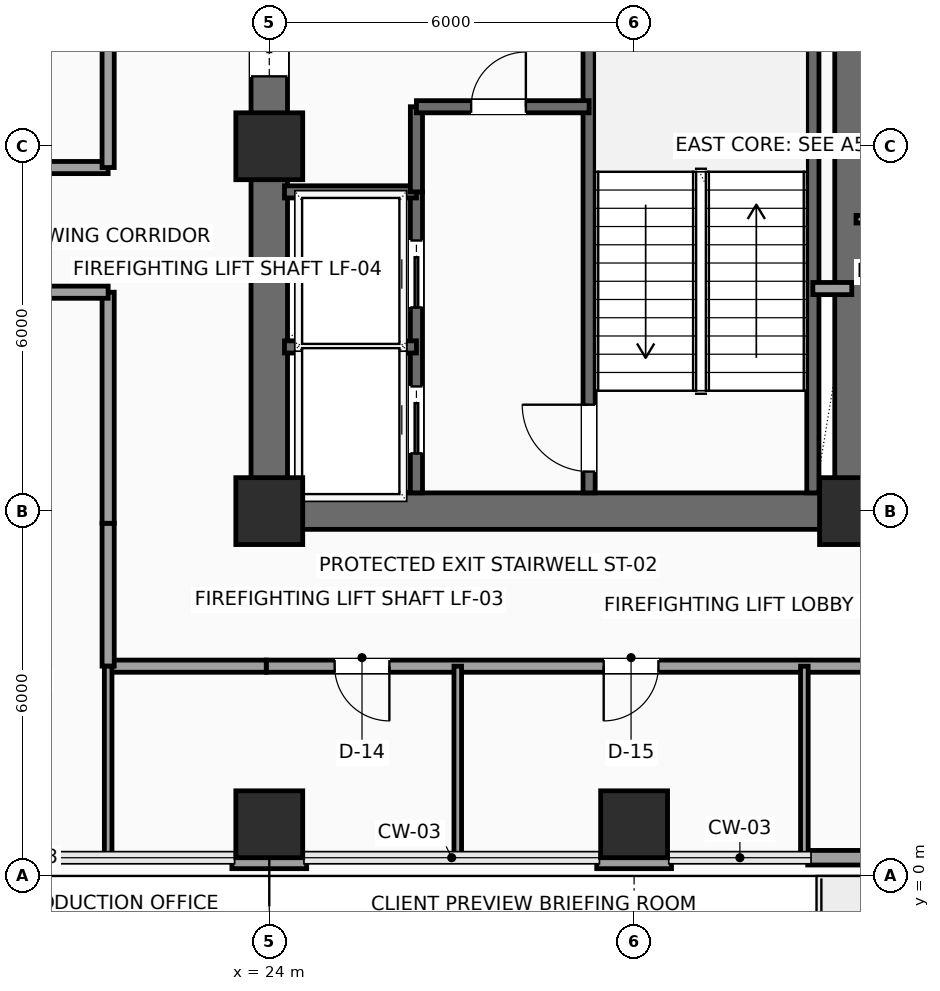
"""IFC4 building model, lengths in metres.
Left out: names, types, materials, properties, quantities, classifications, styles, units other than length and angle.
Written with IfcOpenShell. Run it as: python <this file> out.ifc"""

import sys

from ifc_helpers import new_model, si_unit, direction, frame, frame_2d, origin, origin_2d, place, context, subcontext, project, spatial, rectangle, extrude, element, fill, save


model = new_model("IFC4")
c1 = context("Model", 3, precision=1e-05, world=origin(), true_north=direction((0.0, 1.0)))
c2 = subcontext(c1, "Body", "Model", "MODEL_VIEW")
j1 = project(units=[si_unit("LENGTHUNIT", "METRE"), si_unit("PLANEANGLEUNIT", "RADIAN")], contexts=[c1])
p1 = place(None, origin())
s1 = spatial("IfcSite", under=j1, at=p1, CompositionType="ELEMENT")
p2 = place(p1, origin())
s2 = spatial("IfcBuilding", under=s1, at=p2, CompositionType="ELEMENT")
p3 = place(p2, frame((0.0, 0.0, 153.15)))
s3 = spatial("IfcBuildingStorey", under=s2, at=p3, CompositionType="ELEMENT", Elevation=153.15)
for number, where, z_axis, x_axis in (
    (1, (24.0, 6.0, 0.0), (0.0, 0.0, 1.0), (1.0, 0.0, 0.0)),
    (2, (24.0, 12.0, 0.0), (0.0, 0.0, 1.0), (1.0, 0.0, 0.0)),
    (3, (33.6, 6.0, 0.0), (0.0, 0.0, 1.0), (1.0, 0.0, 0.0)),
    (4, (24.0, 0.85, 0.0), (0.0, 0.0, 1.0), (1.0, 0.0, 0.0)),
    (5, (30.0, 0.85, 0.0), (0.0, 0.0, 1.0), (1.0, 0.0, 0.0)),
):
    element("IfcColumn", number, at=place(p3, frame(where, z_axis=z_axis, x_axis=x_axis)), inside=s3, PredefinedType="COLUMN", context=c2, shape_type="SweptSolid", body=[
        extrude(rectangle(XDim=1.1, YDim=1.1, at=origin_2d()), origin(), (0.0, 0.0, 1.0), 3.75),
    ])
p4 = place(p3, frame((42.145, 0.3, 0.0), z_axis=(0.0, 0.0, 1.0), x_axis=(-1.0, 0.0, 0.0)))
e6 = element("IfcWall", 6, at=p4, inside=s3, PredefinedType="SOLIDWALL", context=c2, shape_type="SweptSolid", body=[
    extrude(rectangle(XDim=9.29, YDim=0.24, at=frame_2d((4.645, 0.0))), origin(), (0.0, 0.0, 1.0), 3.525),
])
p5 = place(p4, frame((4.2, 0.0, 0.0)))
e7 = element("IfcOpeningElement", 7, at=p5, cuts=e6, PredefinedType="OPENING", context=c2, shape_type="SweptSolid", body=[
    extrude(rectangle(XDim=1.05, YDim=2.2, at=frame_2d((0.525, 1.1))), frame((0.0, 0.13, 0.0), z_axis=(0.0, -1.0, 0.0), x_axis=(1.0, 0.0, 0.0)), (0.0, 0.0, 1.0), 0.26),
])
for number, where, z_axis, x_axis in (
    (8, (30.615, 0.24, 0.0), (0.0, 0.0, 1.0), (-1.0, 0.0, 0.0)),
    (9, (24.615, 0.24, 0.0), (0.0, 0.0, 1.0), (-1.0, 0.0, 0.0)),
):
    element("IfcWall", number, at=place(p3, frame(where, z_axis=z_axis, x_axis=x_axis)), inside=s3, PredefinedType="SOLIDWALL", context=c2, shape_type="SweptSolid", body=[
        extrude(rectangle(XDim=1.23, YDim=0.24, at=frame_2d((0.615, 0.0))), origin(), (0.0, 0.0, 1.0), 3.525),
    ])
p6 = place(p3, frame((24.0, 6.0, 0.0), z_axis=(0.0, 0.0, 1.0), x_axis=(1.0, 0.0, 0.0)))
e10 = element("IfcWall", 10, at=p6, inside=s3, PredefinedType="SHEAR", context=c2, shape_type="SweptSolid", body=[
    extrude(rectangle(XDim=9.6, YDim=0.6, at=frame_2d((4.8, 0.0))), origin(), (0.0, 0.0, 1.0), 3.525),
])
p7 = place(p3, frame((24.0, 6.0, 0.0), z_axis=(0.0, 0.0, 1.0), x_axis=(0.0, 1.0, 0.0)))
e11 = element("IfcWall", 11, at=p7, inside=s3, PredefinedType="SHEAR", context=c2, shape_type="SweptSolid", body=[
    extrude(rectangle(XDim=12.0, YDim=0.6, at=frame_2d((6.0, 0.0))), origin(), (0.0, 0.0, 1.0), 3.525),
])
p8 = place(p7, frame((7.15, 0.0, 0.0)))
e12 = element("IfcOpeningElement", 12, at=p8, cuts=e11, PredefinedType="OPENING", context=c2, shape_type="SweptSolid", body=[
    extrude(rectangle(XDim=1.6, YDim=2.3, at=frame_2d((0.8, 1.15))), frame((0.0, 0.31, 0.0), z_axis=(0.0, -1.0, 0.0), x_axis=(1.0, 0.0, 0.0)), (0.0, 0.0, 1.0), 0.62),
])
p9 = place(p3, frame((33.6, 6.0, 0.0), z_axis=(0.0, 0.0, 1.0), x_axis=(0.0, 1.0, 0.0)))
e13 = element("IfcWall", 13, at=p9, inside=s3, PredefinedType="SHEAR", context=c2, shape_type="SweptSolid", body=[
    extrude(rectangle(XDim=12.0, YDim=0.6, at=frame_2d((6.0, 0.0))), origin(), (0.0, 0.0, 1.0), 3.525),
])
p10 = place(p9, frame((10.15, 0.0, 0.0)))
e14 = element("IfcOpeningElement", 14, at=p10, cuts=e13, PredefinedType="OPENING", context=c2, shape_type="SweptSolid", body=[
    extrude(rectangle(XDim=0.9, YDim=2.15, at=frame_2d((0.45, 1.075))), frame((0.0, 0.31, 0.0), z_axis=(0.0, -1.0, 0.0), x_axis=(1.0, 0.0, 0.0)), (0.0, 0.0, 1.0), 0.62),
])
p11 = place(p3, frame((29.26, 6.3, 0.0), z_axis=(0.0, 0.0, 1.0), x_axis=(0.0, 1.0, 0.0)))
e15 = element("IfcWall", 15, at=p11, inside=s3, PredefinedType="SHEAR", context=c2, shape_type="SweptSolid", body=[
    extrude(rectangle(XDim=8.88, YDim=0.2, at=frame_2d((4.44, 0.0))), origin(), (0.0, 0.0, 1.0), 3.525),
])
p12 = place(p11, frame((0.35, 0.0, 0.0)))
e16 = element("IfcOpeningElement", 16, at=p12, cuts=e15, PredefinedType="OPENING", context=c2, shape_type="SweptSolid", body=[
    extrude(rectangle(XDim=1.1, YDim=2.2, at=frame_2d((0.55, 1.1))), frame((0.0, 0.11, 0.0), z_axis=(0.0, -1.0, 0.0), x_axis=(1.0, 0.0, 0.0)), (0.0, 0.0, 1.0), 0.22),
])
p13 = place(p3, frame((32.94, 6.3, 0.0), z_axis=(0.0, 0.0, 1.0), x_axis=(0.0, 1.0, 0.0)))
e17 = element("IfcWall", 17, at=p13, inside=s3, PredefinedType="SHEAR", context=c2, shape_type="SweptSolid", body=[
    extrude(rectangle(XDim=8.88, YDim=0.2, at=frame_2d((4.44, 0.0))), origin(), (0.0, 0.0, 1.0), 3.525),
])
p14 = place(p3, frame((26.42, 6.3, 0.0), z_axis=(0.0, 0.0, 1.0), x_axis=(0.0, 1.0, 0.0)))
e18 = element("IfcWall", 18, at=p14, inside=s3, PredefinedType="SHEAR", context=c2, shape_type="SweptSolid", body=[
    extrude(rectangle(XDim=4.95, YDim=0.2, at=frame_2d((2.475, 0.0))), origin(), (0.0, 0.0, 1.0), 3.525),
])
p15 = place(p14, frame((0.65, 0.0, 0.0)))
e19 = element("IfcOpeningElement", 19, at=p15, cuts=e18, PredefinedType="OPENING", context=c2, shape_type="SweptSolid", body=[
    extrude(rectangle(XDim=1.1, YDim=2.2, at=frame_2d((0.55, 1.1))), frame((0.0, 0.11, 0.0), z_axis=(0.0, -1.0, 0.0), x_axis=(1.0, 0.0, 0.0)), (0.0, 0.0, 1.0), 0.22),
])
p16 = place(p14, frame((3.05, 0.0, 0.0)))
e20 = element("IfcOpeningElement", 20, at=p16, cuts=e18, PredefinedType="OPENING", context=c2, shape_type="SweptSolid", body=[
    extrude(rectangle(XDim=1.1, YDim=2.2, at=frame_2d((0.55, 1.1))), frame((0.0, 0.11, 0.0), z_axis=(0.0, -1.0, 0.0), x_axis=(1.0, 0.0, 0.0)), (0.0, 0.0, 1.0), 0.22),
])
for number, where, z_axis, x_axis in (
    (21, (24.25, 8.7, 0.0), (0.0, 0.0, 1.0), (1.0, 0.0, 0.0)),
    (22, (24.25, 11.25, 0.0), (0.0, 0.0, 1.0), (1.0, 0.0, 0.0)),
):
    element("IfcWall", number, at=place(p3, frame(where, z_axis=z_axis, x_axis=x_axis)), inside=s3, PredefinedType="SHEAR", context=c2, shape_type="SweptSolid", body=[
        extrude(rectangle(XDim=2.17, YDim=0.2, at=frame_2d((1.085, 0.0))), origin(), (0.0, 0.0, 1.0), 3.525),
    ])
p17 = place(p3, frame((26.42, 11.25, 0.0), z_axis=(0.0, 0.0, 1.0), x_axis=(0.0, 1.0, 0.0)))
e23 = element("IfcWall", 23, at=p17, inside=s3, PredefinedType="SHEAR", context=c2, shape_type="SweptSolid", body=[
    extrude(rectangle(XDim=1.4, YDim=0.2, at=frame_2d((0.7, 0.0))), origin(), (0.0, 0.0, 1.0), 3.525),
])
p18 = place(p3, frame((26.42, 12.65, 0.0), z_axis=(0.0, 0.0, 1.0), x_axis=(1.0, 0.0, 0.0)))
e24 = element("IfcWall", 24, at=p18, inside=s3, PredefinedType="SHEAR", context=c2, shape_type="SweptSolid", body=[
    extrude(rectangle(XDim=2.84, YDim=0.2, at=frame_2d((1.42, 0.0))), origin(), (0.0, 0.0, 1.0), 3.525),
])
p19 = place(p18, frame((0.9, 0.0, 0.0)))
e25 = element("IfcOpeningElement", 25, at=p19, cuts=e24, PredefinedType="OPENING", context=c2, shape_type="SweptSolid", body=[
    extrude(rectangle(XDim=0.9, YDim=2.15, at=frame_2d((0.45, 1.075))), frame((0.0, 0.11, 0.0), z_axis=(0.0, -1.0, 0.0), x_axis=(1.0, 0.0, 0.0)), (0.0, 0.0, 1.0), 0.22),
])
p20 = place(p3, frame((32.94, 9.66, 0.0), z_axis=(0.0, 0.0, 1.0), x_axis=(1.0, 0.0, 0.0)))
e26 = element("IfcWall", 26, at=p20, inside=s3, PredefinedType="SOLIDWALL", context=c2, shape_type="SweptSolid", body=[
    extrude(rectangle(XDim=0.64, YDim=0.2, at=frame_2d((0.32, 0.0))), origin(), (0.0, 0.0, 1.0), 3.525),
])
p21 = place(p3, frame((36.15, 3.45, 0.0), z_axis=(0.0, 0.0, 1.0), x_axis=(-1.0, 0.0, 0.0)))
e27 = element("IfcWall", 27, at=p21, inside=s3, PredefinedType="SOLIDWALL", context=c2, shape_type="SweptSolid", body=[
    extrude(rectangle(XDim=12.2, YDim=0.2, at=frame_2d((6.1, 0.0))), origin(), (0.0, 0.0, 1.0), 3.067),
])
p22 = place(p21, frame((10.175, 0.0, 0.0)))
e28 = element("IfcOpeningElement", 28, at=p22, cuts=e27, PredefinedType="OPENING", context=c2, shape_type="SweptSolid", body=[
    extrude(rectangle(XDim=0.9, YDim=2.1, at=frame_2d((0.45, 1.05))), frame((0.0, 0.11, 0.0), z_axis=(0.0, -1.0, 0.0), x_axis=(1.0, 0.0, 0.0)), (0.0, 0.0, 1.0), 0.22),
])
p23 = place(p21, frame((5.75, 0.0, 0.0)))
e29 = element("IfcOpeningElement", 29, at=p23, cuts=e27, PredefinedType="OPENING", context=c2, shape_type="SweptSolid", body=[
    extrude(rectangle(XDim=0.9, YDim=2.1, at=frame_2d((0.45, 1.05))), frame((0.0, 0.11, 0.0), z_axis=(0.0, -1.0, 0.0), x_axis=(1.0, 0.0, 0.0)), (0.0, 0.0, 1.0), 0.22),
])
p24 = place(p3, frame((23.95, 3.45, 0.0), z_axis=(0.0, 0.0, 1.0), x_axis=(-1.0, 0.0, 0.0)))
e30 = element("IfcWall", 30, at=p24, inside=s3, PredefinedType="SOLIDWALL", context=c2, shape_type="SweptSolid", body=[
    extrude(rectangle(XDim=2.6, YDim=0.2, at=frame_2d((1.3, 0.0))), origin(), (0.0, 0.0, 1.0), 3.067),
])
p25 = place(p3, frame((21.35, 3.45, 0.0), z_axis=(0.0, 0.0, 1.0), x_axis=(0.0, 1.0, 0.0)))
e31 = element("IfcWall", 31, at=p25, inside=s3, PredefinedType="SOLIDWALL", context=c2, shape_type="SweptSolid", body=[
    extrude(rectangle(XDim=2.35, YDim=0.2, at=frame_2d((1.175, 0.0))), origin(), (0.0, 0.0, 1.0), 3.525),
])
p26 = place(p3, frame((21.35, 5.8, 0.0), z_axis=(0.0, 0.0, 1.0), x_axis=(0.0, 1.0, 0.0)))
e32 = element("IfcWall", 32, at=p26, inside=s3, PredefinedType="SOLIDWALL", context=c2, shape_type="SweptSolid", body=[
    extrude(rectangle(XDim=3.8, YDim=0.2, at=frame_2d((1.9, 0.0))), origin(), (0.0, 0.0, 1.0), 3.525),
])
p27 = place(p3, frame((21.35, 9.6, 0.0), z_axis=(0.0, 0.0, 1.0), x_axis=(-1.0, 0.0, 0.0)))
e33 = element("IfcWall", 33, at=p27, inside=s3, PredefinedType="SOLIDWALL", context=c2, shape_type="SweptSolid", body=[
    extrude(rectangle(XDim=18.15, YDim=0.2, at=frame_2d((9.075, 0.0))), origin(), (0.0, 0.0, 1.0), 3.525),
])
p28 = place(p27, frame((14.7, 0.0, 0.0)))
e34 = element("IfcOpeningElement", 34, at=p28, cuts=e33, PredefinedType="OPENING", context=c2, shape_type="SweptSolid", body=[
    extrude(rectangle(XDim=0.9, YDim=2.1, at=frame_2d((0.45, 1.05))), frame((0.0, 0.11, 0.0), z_axis=(0.0, -1.0, 0.0), x_axis=(1.0, 0.0, 0.0)), (0.0, 0.0, 1.0), 0.22),
])
p29 = place(p27, frame((8.6, 0.0, 0.0)))
e35 = element("IfcOpeningElement", 35, at=p29, cuts=e33, PredefinedType="OPENING", context=c2, shape_type="SweptSolid", body=[
    extrude(rectangle(XDim=0.9, YDim=2.1, at=frame_2d((0.45, 1.05))), frame((0.0, 0.11, 0.0), z_axis=(0.0, -1.0, 0.0), x_axis=(1.0, 0.0, 0.0)), (0.0, 0.0, 1.0), 0.22),
])
p30 = place(p27, frame((2.525, 0.0, 0.0)))
e36 = element("IfcOpeningElement", 36, at=p30, cuts=e33, PredefinedType="OPENING", context=c2, shape_type="SweptSolid", body=[
    extrude(rectangle(XDim=0.9, YDim=2.1, at=frame_2d((0.45, 1.05))), frame((0.0, 0.11, 0.0), z_axis=(0.0, -1.0, 0.0), x_axis=(1.0, 0.0, 0.0)), (0.0, 0.0, 1.0), 0.22),
])
p31 = place(p3, frame((10.8, 11.65, 0.0), z_axis=(0.0, 0.0, 1.0), x_axis=(1.0, 0.0, 0.0)))
e37 = element("IfcWall", 37, at=p31, inside=s3, PredefinedType="SOLIDWALL", context=c2, shape_type="SweptSolid", body=[
    extrude(rectangle(XDim=10.55, YDim=0.2, at=frame_2d((5.275, 0.0))), origin(), (0.0, 0.0, 1.0), 3.525),
])
p32 = place(p31, frame((1.98, 0.0, 0.0)))
e38 = element("IfcOpeningElement", 38, at=p32, cuts=e37, PredefinedType="OPENING", context=c2, shape_type="SweptSolid", body=[
    extrude(rectangle(XDim=0.9, YDim=2.1, at=frame_2d((0.45, 1.05))), frame((0.0, 0.11, 0.0), z_axis=(0.0, -1.0, 0.0), x_axis=(1.0, 0.0, 0.0)), (0.0, 0.0, 1.0), 0.22),
])
p33 = place(p31, frame((4.95, 0.0, 0.0)))
e39 = element("IfcOpeningElement", 39, at=p33, cuts=e37, PredefinedType="OPENING", context=c2, shape_type="SweptSolid", body=[
    extrude(rectangle(XDim=0.9, YDim=2.1, at=frame_2d((0.45, 1.05))), frame((0.0, 0.11, 0.0), z_axis=(0.0, -1.0, 0.0), x_axis=(1.0, 0.0, 0.0)), (0.0, 0.0, 1.0), 0.22),
])
p34 = place(p31, frame((8.425, 0.0, 0.0)))
e40 = element("IfcOpeningElement", 40, at=p34, cuts=e37, PredefinedType="OPENING", context=c2, shape_type="SweptSolid", body=[
    extrude(rectangle(XDim=0.9, YDim=2.1, at=frame_2d((0.45, 1.05))), frame((0.0, 0.11, 0.0), z_axis=(0.0, -1.0, 0.0), x_axis=(1.0, 0.0, 0.0)), (0.0, 0.0, 1.0), 0.22),
])
p35 = place(p3, frame((21.35, 11.65, 0.0), z_axis=(0.0, 0.0, 1.0), x_axis=(0.0, 1.0, 0.0)))
e41 = element("IfcWall", 41, at=p35, inside=s3, PredefinedType="SOLIDWALL", context=c2, shape_type="SweptSolid", body=[
    extrude(rectangle(XDim=18.6, YDim=0.2, at=frame_2d((9.3, 0.0))), origin(), (0.0, 0.0, 1.0), 3.525),
])
p36 = place(p35, frame((7.2, 0.0, 0.0)))
e42 = element("IfcOpeningElement", 42, at=p36, cuts=e41, PredefinedType="OPENING", context=c2, shape_type="SweptSolid", body=[
    extrude(rectangle(XDim=0.95, YDim=2.15, at=frame_2d((0.475, 1.075))), frame((0.0, 0.11, 0.0), z_axis=(0.0, -1.0, 0.0), x_axis=(1.0, 0.0, 0.0)), (0.0, 0.0, 1.0), 0.22),
])
p37 = place(p35, frame((10.45, 0.0, 0.0)))
e43 = element("IfcOpeningElement", 43, at=p37, cuts=e41, PredefinedType="OPENING", context=c2, shape_type="SweptSolid", body=[
    extrude(rectangle(XDim=0.9, YDim=2.1, at=frame_2d((0.45, 1.05))), frame((0.0, 0.11, 0.0), z_axis=(0.0, -1.0, 0.0), x_axis=(1.0, 0.0, 0.0)), (0.0, 0.0, 1.0), 0.22),
])
p38 = place(p35, frame((13.9, 0.0, 0.0)))
e44 = element("IfcOpeningElement", 44, at=p38, cuts=e41, PredefinedType="OPENING", context=c2, shape_type="SweptSolid", body=[
    extrude(rectangle(XDim=0.95, YDim=2.15, at=frame_2d((0.475, 1.075))), frame((0.0, 0.11, 0.0), z_axis=(0.0, -1.0, 0.0), x_axis=(1.0, 0.0, 0.0)), (0.0, 0.0, 1.0), 0.22),
])
p39 = place(p35, frame((4.65, 0.0, 0.0)))
e45 = element("IfcOpeningElement", 45, at=p39, cuts=e41, PredefinedType="OPENING", context=c2, shape_type="SweptSolid", body=[
    extrude(rectangle(XDim=0.9, YDim=2.1, at=frame_2d((0.45, 1.05))), frame((0.0, 0.11, 0.0), z_axis=(0.0, -1.0, 0.0), x_axis=(1.0, 0.0, 0.0)), (0.0, 0.0, 1.0), 0.22),
])
for number, where, z_axis, x_axis in (
    (46, (21.35, 0.3, 0.0), (0.0, 0.0, 1.0), (0.0, 1.0, 0.0)),
    (47, (27.1, 0.3, 0.0), (0.0, 0.0, 1.0), (0.0, 1.0, 0.0)),
    (48, (32.8, 0.3, 0.0), (0.0, 0.0, 1.0), (0.0, 1.0, 0.0)),
):
    element("IfcWall", number, at=place(p3, frame(where, z_axis=z_axis, x_axis=x_axis)), inside=s3, PredefinedType="PARTITIONING", context=c2, shape_type="SweptSolid", body=[
        extrude(rectangle(XDim=3.15, YDim=0.125, at=frame_2d((1.575, 0.0))), origin(), (0.0, 0.0, 1.0), 3.525),
    ])
p40 = place(p3, frame((33.65, 5.8, 0.0), z_axis=(0.0, 0.0, 1.0), x_axis=(1.0, 0.0, 0.0)))
e49 = element("IfcWall", 49, at=p40, inside=s3, PredefinedType="PARTITIONING", context=c2, shape_type="SweptSolid", body=[
    extrude(rectangle(XDim=2.5, YDim=0.125, at=frame_2d((1.25, 0.0))), origin(), (0.0, 0.0, 1.0), 3.017),
])
p41 = place(p3, frame((33.65, 10.8, 0.0), z_axis=(0.0, 0.0, 1.0), x_axis=(1.0, 0.0, 0.0)))
e50 = element("IfcWall", 50, at=p41, inside=s3, PredefinedType="PARTITIONING", context=c2, shape_type="SweptSolid", body=[
    extrude(rectangle(XDim=2.5, YDim=0.125, at=frame_2d((1.25, 0.0))), origin(), (0.0, 0.0, 1.0), 3.525),
])
p42 = place(p8, origin())
e51 = element("IfcDoor", 51, at=p42, inside=s3, OperationType="DOUBLE_DOOR_SLIDING", PredefinedType="DOOR", context=c2, shape_type="SweptSolid", body=[
    extrude(rectangle(XDim=1.6, YDim=2.3, at=frame_2d((0.8, 1.15))), frame((0.0, 0.025, 0.0), z_axis=(0.0, -1.0, 0.0), x_axis=(1.0, 0.0, 0.0)), (0.0, 0.0, 1.0), 0.05),
])
fill(e12, e51)
p43 = place(p12, origin())
e52 = element("IfcDoor", 52, at=p43, inside=s3, OperationType="SINGLE_SWING_RIGHT", PredefinedType="DOOR", context=c2, shape_type="SweptSolid", body=[
    extrude(rectangle(XDim=1.1, YDim=2.2, at=frame_2d((0.55, 1.1))), frame((0.0, 0.025, 0.0), z_axis=(0.0, -1.0, 0.0), x_axis=(1.0, 0.0, 0.0)), (0.0, 0.0, 1.0), 0.05),
])
fill(e16, e52)
p44 = place(p15, origin())
e53 = element("IfcDoor", 53, at=p44, inside=s3, OperationType="SLIDING_TO_LEFT", PredefinedType="DOOR", context=c2, shape_type="SweptSolid", body=[
    extrude(rectangle(XDim=1.1, YDim=2.2, at=frame_2d((0.55, 1.1))), frame((0.0, 0.025, 0.0), z_axis=(0.0, -1.0, 0.0), x_axis=(1.0, 0.0, 0.0)), (0.0, 0.0, 1.0), 0.05),
])
fill(e19, e53)
p45 = place(p16, origin())
e54 = element("IfcDoor", 54, at=p45, inside=s3, OperationType="SLIDING_TO_LEFT", PredefinedType="DOOR", context=c2, shape_type="SweptSolid", body=[
    extrude(rectangle(XDim=1.1, YDim=2.2, at=frame_2d((0.55, 1.1))), frame((0.0, 0.025, 0.0), z_axis=(0.0, -1.0, 0.0), x_axis=(1.0, 0.0, 0.0)), (0.0, 0.0, 1.0), 0.05),
])
fill(e20, e54)
p46 = place(p19, origin())
e55 = element("IfcDoor", 55, at=p46, inside=s3, OperationType="SINGLE_SWING_RIGHT", PredefinedType="DOOR", context=c2, shape_type="SweptSolid", body=[
    extrude(rectangle(XDim=0.9, YDim=2.15, at=frame_2d((0.45, 1.075))), frame((0.0, 0.025, 0.0), z_axis=(0.0, -1.0, 0.0), x_axis=(1.0, 0.0, 0.0)), (0.0, 0.0, 1.0), 0.05),
])
fill(e25, e55)
p47 = place(p22, origin())
e56 = element("IfcDoor", 56, at=p47, inside=s3, OperationType="SINGLE_SWING_LEFT", PredefinedType="DOOR", context=c2, shape_type="SweptSolid", body=[
    extrude(rectangle(XDim=0.9, YDim=2.1, at=frame_2d((0.45, 1.05))), frame((0.0, 0.025, 0.0), z_axis=(0.0, -1.0, 0.0), x_axis=(1.0, 0.0, 0.0)), (0.0, 0.0, 1.0), 0.05),
])
fill(e28, e56)
p48 = place(p23, origin())
e57 = element("IfcDoor", 57, at=p48, inside=s3, OperationType="SINGLE_SWING_RIGHT", PredefinedType="DOOR", context=c2, shape_type="SweptSolid", body=[
    extrude(rectangle(XDim=0.9, YDim=2.1, at=frame_2d((0.45, 1.05))), frame((0.0, 0.025, 0.0), z_axis=(0.0, -1.0, 0.0), x_axis=(1.0, 0.0, 0.0)), (0.0, 0.0, 1.0), 0.05),
])
fill(e29, e57)
save(model, sys.argv[1])
